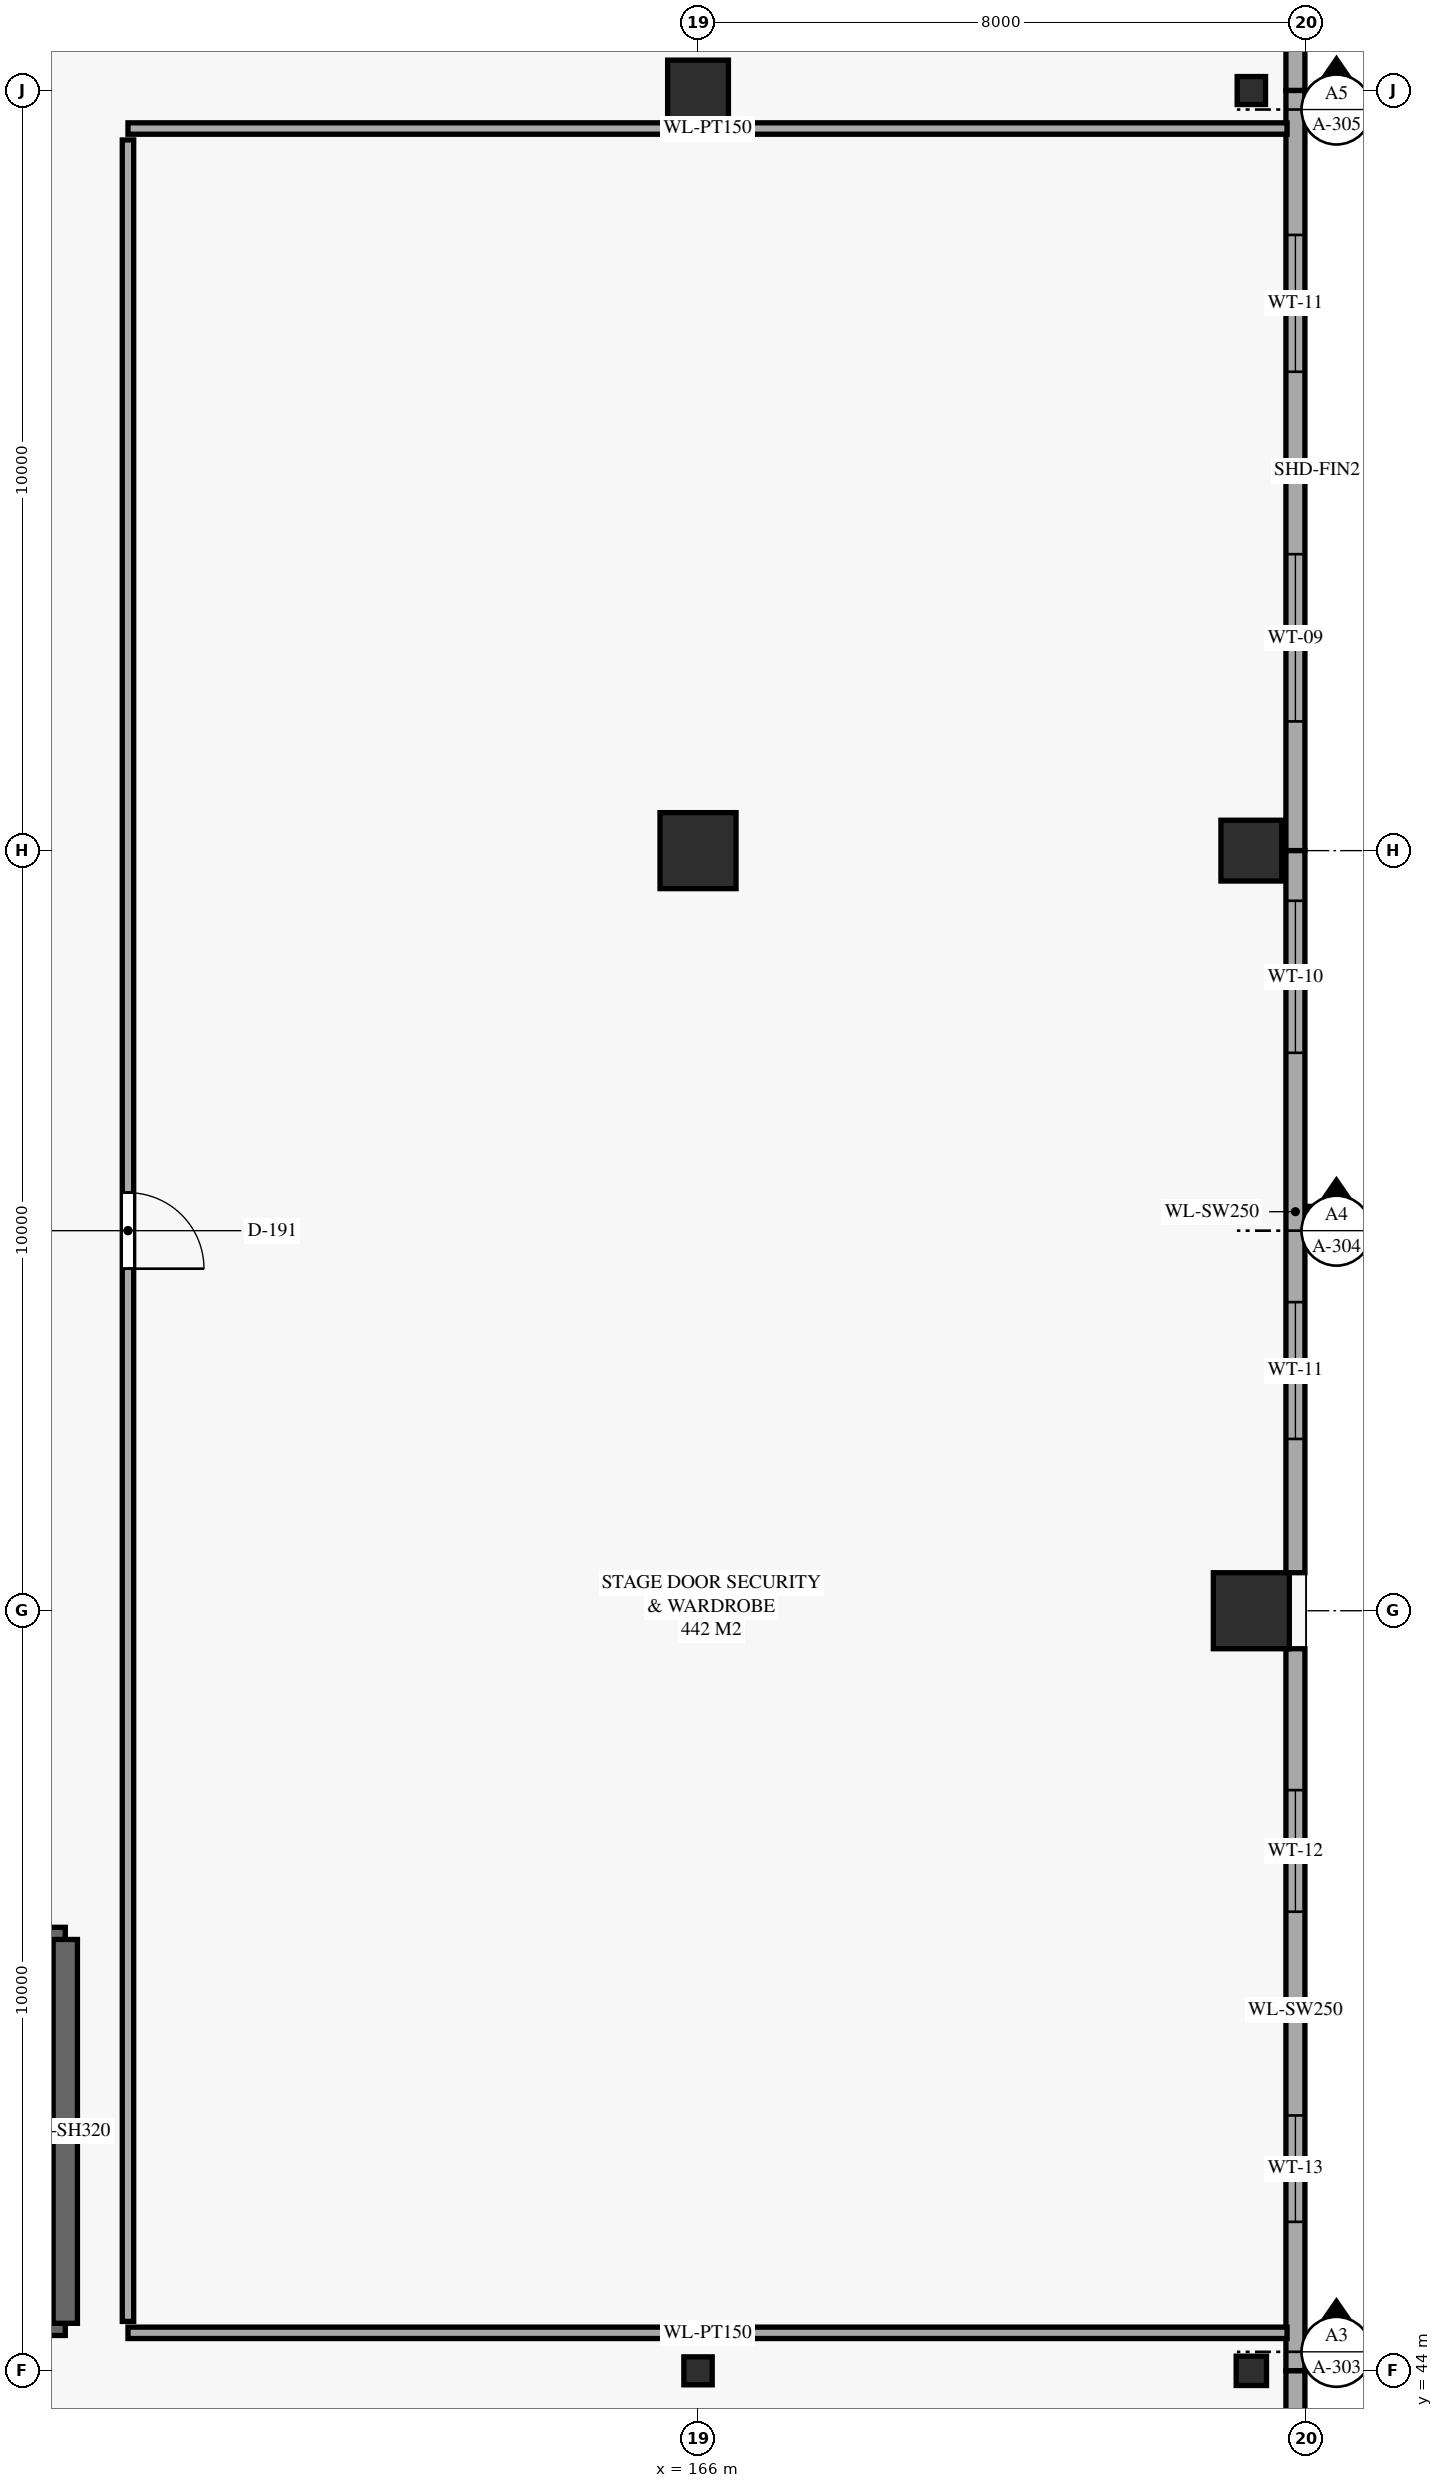
"""IFC4 building model, lengths in metres.
Left out: names, types, materials, properties, quantities, classifications, styles, units other than length and angle.
Written with IfcOpenShell. Run it as: python <this file> out.ifc"""

import sys

from ifc_helpers import new_model, si_unit, direction, frame, frame_2d, origin, origin_2d, place, context, subcontext, project, spatial, rectangle, i_section, extrude, element, fill, save


model = new_model("IFC4")
c1 = context("Model", 3, precision=1e-05, world=origin(), true_north=direction((0.0, 1.0)))
c2 = subcontext(c1, "Body", "Model", "MODEL_VIEW")
j1 = project(units=[si_unit("LENGTHUNIT", "METRE"), si_unit("PLANEANGLEUNIT", "RADIAN")], contexts=[c1])
p1 = place(None, origin())
s1 = spatial("IfcSite", under=j1, at=p1, CompositionType="ELEMENT")
p2 = place(p1, origin())
s2 = spatial("IfcBuilding", under=s1, at=p2, CompositionType="ELEMENT")
p3 = place(p2, origin())
s3 = spatial("IfcBuildingStorey", under=s2, at=p3, CompositionType="ELEMENT", Elevation=0.0)
p4 = place(p3, frame((166.0, 44.0, 0.0), z_axis=(0.0, 0.0, 1.0), x_axis=(1.0, 0.0, 0.0)))
e1 = element("IfcColumn", 1, at=p4, inside=s3, PredefinedType="COLUMN", context=c2, shape_type="SweptSolid", body=[
    extrude(i_section(OverallWidth=0.373, OverallDepth=0.368, WebThickness=0.015, FlangeThickness=0.024, FilletRadius=0.015, at=origin_2d()), origin(), (0.0, 0.0, 1.0), 5.0),
])
p5 = place(p3, frame((166.0, 54.0, 0.0), z_axis=(0.0, 0.0, 1.0), x_axis=(1.0, 0.0, 0.0)))
e2 = element("IfcColumn", 2, at=p5, inside=s3, PredefinedType="COLUMN", context=c2, shape_type="SweptSolid", body=[
    extrude(i_section(OverallWidth=0.399, OverallDepth=0.386, WebThickness=0.021, FlangeThickness=0.033, FilletRadius=0.016, at=origin_2d()), origin(), (0.0, 0.0, 1.0), 5.0),
])
p6 = place(p3, frame((166.0, 64.0, 0.0), z_axis=(0.0, 0.0, 1.0), x_axis=(1.0, 0.0, 0.0)))
e3 = element("IfcColumn", 3, at=p6, inside=s3, PredefinedType="COLUMN", context=c2, shape_type="SweptSolid", body=[
    extrude(rectangle(XDim=1.0, YDim=1.0, at=origin_2d()), origin(), (0.0, 0.0, 1.0), 5.0),
])
p7 = place(p3, frame((166.0, 74.0, 0.0), z_axis=(0.0, 0.0, 1.0), x_axis=(1.0, 0.0, 0.0)))
e4 = element("IfcColumn", 4, at=p7, inside=s3, PredefinedType="COLUMN", context=c2, shape_type="SweptSolid", body=[
    extrude(rectangle(XDim=0.8, YDim=0.8, at=origin_2d()), origin(), (0.0, 0.0, 1.0), 5.0),
])
p8 = place(p3, frame((173.28, 44.0, 0.0), z_axis=(0.0, 0.0, 1.0), x_axis=(1.0, 0.0, 0.0)))
e5 = element("IfcColumn", 5, at=p8, inside=s3, PredefinedType="COLUMN", context=c2, shape_type="SweptSolid", body=[
    extrude(i_section(OverallWidth=0.399, OverallDepth=0.386, WebThickness=0.021, FlangeThickness=0.033, FilletRadius=0.016, at=origin_2d()), origin(), (0.0, 0.0, 1.0), 5.0),
])
p9 = place(p3, frame((173.28, 54.0, 0.0), z_axis=(0.0, 0.0, 1.0), x_axis=(1.0, 0.0, 0.0)))
e6 = element("IfcColumn", 6, at=p9, inside=s3, PredefinedType="COLUMN", context=c2, shape_type="SweptSolid", body=[
    extrude(rectangle(XDim=1.0, YDim=1.0, at=origin_2d()), origin(), (0.0, 0.0, 1.0), 5.0),
])
p10 = place(p3, frame((173.28, 64.0, 0.0), z_axis=(0.0, 0.0, 1.0), x_axis=(1.0, 0.0, 0.0)))
e7 = element("IfcColumn", 7, at=p10, inside=s3, PredefinedType="COLUMN", context=c2, shape_type="SweptSolid", body=[
    extrude(rectangle(XDim=0.8, YDim=0.8, at=origin_2d()), origin(), (0.0, 0.0, 1.0), 5.0),
])
p11 = place(p3, frame((173.28, 74.0, 0.0), z_axis=(0.0, 0.0, 1.0), x_axis=(1.0, 0.0, 0.0)))
e8 = element("IfcColumn", 8, at=p11, inside=s3, PredefinedType="COLUMN", context=c2, shape_type="SweptSolid", body=[
    extrude(i_section(OverallWidth=0.373, OverallDepth=0.368, WebThickness=0.015, FlangeThickness=0.024, FilletRadius=0.015, at=origin_2d()), origin(), (0.0, 0.0, 1.0), 5.0),
])
p12 = place(p3, frame((148.425, 44.625, 0.0), z_axis=(0.0, 0.0, 1.0), x_axis=(1.0, 0.0, 0.0)))
e9 = element("IfcWall", 9, at=p12, inside=s3, PredefinedType="SHEAR", context=c2, shape_type="SweptSolid", body=[
    extrude(rectangle(XDim=9.25, YDim=0.32, at=frame_2d((4.625, 0.0))), origin(), (0.0, 0.0, 1.0), 4.72),
])
p13 = place(p3, frame((157.675, 49.675, 0.0), z_axis=(0.0, 0.0, 1.0), x_axis=(-1.0, 0.0, 0.0)))
e10 = element("IfcWall", 10, at=p13, inside=s3, PredefinedType="SHEAR", context=c2, shape_type="SweptSolid", body=[
    extrude(rectangle(XDim=9.25, YDim=0.32, at=frame_2d((4.625, 0.0))), origin(), (0.0, 0.0, 1.0), 4.72),
])
p14 = place(p13, frame((7.2, 0.0, 0.0)))
e11 = element("IfcOpeningElement", 11, at=p14, cuts=e10, PredefinedType="OPENING", context=c2, shape_type="SweptSolid", body=[
    extrude(rectangle(XDim=1.15, YDim=2.2, at=frame_2d((0.575, 1.1))), frame((0.0, 0.17, 0.0), z_axis=(0.0, -1.0, 0.0), x_axis=(1.0, 0.0, 0.0)), (0.0, 0.0, 1.0), 0.34),
])
p15 = place(p3, frame((157.675, 44.625, 0.0), z_axis=(0.0, 0.0, 1.0), x_axis=(0.0, 1.0, 0.0)))
e12 = element("IfcWall", 12, at=p15, inside=s3, PredefinedType="SHEAR", context=c2, shape_type="SweptSolid", body=[
    extrude(rectangle(XDim=5.05, YDim=0.32, at=frame_2d((2.525, 0.0))), origin(), (0.0, 0.0, 1.0), 4.72),
])
p16 = place(p3, frame((173.86, 84.0, 0.0), z_axis=(0.0, 0.0, 1.0), x_axis=(0.0, -1.0, 0.0)))
e13 = element("IfcWall", 13, at=p16, inside=s3, PredefinedType="SOLIDWALL", context=c2, shape_type="SweptSolid", body=[
    extrude(rectangle(XDim=10.0, YDim=0.25, at=frame_2d((5.0, 0.0))), origin(), (0.0, 0.0, 1.0), 4.69),
])
p17 = place(p16, frame((2.1, 0.0, 0.65)))
e14 = element("IfcOpeningElement", 14, at=p17, cuts=e13, PredefinedType="OPENING", context=c2, shape_type="SweptSolid", body=[
    extrude(rectangle(XDim=1.4, YDim=2.3, at=frame_2d((0.7, 1.15))), frame((0.0, 0.135, 0.0), z_axis=(0.0, -1.0, 0.0), x_axis=(1.0, 0.0, 0.0)), (0.0, 0.0, 1.0), 0.27),
])
p18 = place(p16, frame((6.6, 0.0, 0.65)))
e15 = element("IfcOpeningElement", 15, at=p18, cuts=e13, PredefinedType="OPENING", context=c2, shape_type="SweptSolid", body=[
    extrude(rectangle(XDim=1.2, YDim=2.3, at=frame_2d((0.6, 1.15))), frame((0.0, 0.135, 0.0), z_axis=(0.0, -1.0, 0.0), x_axis=(1.0, 0.0, 0.0)), (0.0, 0.0, 1.0), 0.27),
])
p19 = place(p3, frame((173.86, 74.0, 0.0), z_axis=(0.0, 0.0, 1.0), x_axis=(0.0, -1.0, 0.0)))
e16 = element("IfcWall", 16, at=p19, inside=s3, PredefinedType="SOLIDWALL", context=c2, shape_type="SweptSolid", body=[
    extrude(rectangle(XDim=10.0, YDim=0.25, at=frame_2d((5.0, 0.0))), origin(), (0.0, 0.0, 1.0), 4.72),
])
p20 = place(p19, frame((1.9, 0.0, 0.65)))
e17 = element("IfcOpeningElement", 17, at=p20, cuts=e16, PredefinedType="OPENING", context=c2, shape_type="SweptSolid", body=[
    extrude(rectangle(XDim=1.8, YDim=2.05, at=frame_2d((0.9, 1.025))), frame((0.0, 0.135, 0.0), z_axis=(0.0, -1.0, 0.0), x_axis=(1.0, 0.0, 0.0)), (0.0, 0.0, 1.0), 0.27),
])
p21 = place(p19, frame((6.1, 0.0, 0.65)))
e18 = element("IfcOpeningElement", 18, at=p21, cuts=e16, PredefinedType="OPENING", context=c2, shape_type="SweptSolid", body=[
    extrude(rectangle(XDim=2.2, YDim=2.05, at=frame_2d((1.1, 1.025))), frame((0.0, 0.135, 0.0), z_axis=(0.0, -1.0, 0.0), x_axis=(1.0, 0.0, 0.0)), (0.0, 0.0, 1.0), 0.27),
])
p22 = place(p3, frame((173.86, 64.0, 0.0), z_axis=(0.0, 0.0, 1.0), x_axis=(0.0, -1.0, 0.0)))
e19 = element("IfcWall", 19, at=p22, inside=s3, PredefinedType="SOLIDWALL", context=c2, shape_type="SweptSolid", body=[
    extrude(rectangle(XDim=9.5, YDim=0.25, at=frame_2d((4.75, 0.0))), origin(), (0.0, 0.0, 1.0), 4.72),
])
p23 = place(p22, frame((0.66, 0.0, 0.65)))
e20 = element("IfcOpeningElement", 20, at=p23, cuts=e19, PredefinedType="OPENING", context=c2, shape_type="SweptSolid", body=[
    extrude(rectangle(XDim=2.0, YDim=2.05, at=frame_2d((1.0, 1.025))), frame((0.0, 0.135, 0.0), z_axis=(0.0, -1.0, 0.0), x_axis=(1.0, 0.0, 0.0)), (0.0, 0.0, 1.0), 0.27),
])
p24 = place(p22, frame((5.94, 0.0, 0.65)))
e21 = element("IfcOpeningElement", 21, at=p24, cuts=e19, PredefinedType="OPENING", context=c2, shape_type="SweptSolid", body=[
    extrude(rectangle(XDim=1.8, YDim=2.05, at=frame_2d((0.9, 1.025))), frame((0.0, 0.135, 0.0), z_axis=(0.0, -1.0, 0.0), x_axis=(1.0, 0.0, 0.0)), (0.0, 0.0, 1.0), 0.27),
])
p25 = place(p3, frame((173.86, 53.5, 0.0), z_axis=(0.0, 0.0, 1.0), x_axis=(0.0, -1.0, 0.0)))
e22 = element("IfcWall", 22, at=p25, inside=s3, PredefinedType="SOLIDWALL", context=c2, shape_type="SweptSolid", body=[
    extrude(rectangle(XDim=9.5, YDim=0.25, at=frame_2d((4.75, 0.0))), origin(), (0.0, 0.0, 1.0), 4.72),
])
p26 = place(p25, frame((1.86, 0.0, 0.65)))
e23 = element("IfcOpeningElement", 23, at=p26, cuts=e22, PredefinedType="OPENING", context=c2, shape_type="SweptSolid", body=[
    extrude(rectangle(XDim=1.6, YDim=2.05, at=frame_2d((0.8, 1.025))), frame((0.0, 0.135, 0.0), z_axis=(0.0, -1.0, 0.0), x_axis=(1.0, 0.0, 0.0)), (0.0, 0.0, 1.0), 0.27),
])
p27 = place(p25, frame((6.14, 0.0, 0.65)))
e24 = element("IfcOpeningElement", 24, at=p27, cuts=e22, PredefinedType="OPENING", context=c2, shape_type="SweptSolid", body=[
    extrude(rectangle(XDim=1.4, YDim=2.05, at=frame_2d((0.7, 1.025))), frame((0.0, 0.135, 0.0), z_axis=(0.0, -1.0, 0.0), x_axis=(1.0, 0.0, 0.0)), (0.0, 0.0, 1.0), 0.27),
])
p28 = place(p3, frame((173.86, 44.0, 0.0), z_axis=(0.0, 0.0, 1.0), x_axis=(0.0, -1.0, 0.0)))
e25 = element("IfcWall", 25, at=p28, inside=s3, PredefinedType="SOLIDWALL", context=c2, shape_type="SweptSolid", body=[
    extrude(rectangle(XDim=5.28, YDim=0.25, at=frame_2d((2.64, 0.0))), origin(), (0.0, 0.0, 1.0), 4.72),
])
p29 = place(p28, frame((2.04, 0.0, 0.65)))
e26 = element("IfcOpeningElement", 26, at=p29, cuts=e25, PredefinedType="OPENING", context=c2, shape_type="SweptSolid", body=[
    extrude(rectangle(XDim=1.2, YDim=2.05, at=frame_2d((0.6, 1.025))), frame((0.0, 0.135, 0.0), z_axis=(0.0, -1.0, 0.0), x_axis=(1.0, 0.0, 0.0)), (0.0, 0.0, 1.0), 0.27),
])
for number, where, z_axis, x_axis in (
    (27, (158.5, 44.5, 0.0), (0.0, 0.0, 1.0), (1.0, 0.0, 0.0)),
    (28, (173.75, 73.5, 0.0), (0.0, 0.0, 1.0), (-1.0, 0.0, 0.0)),
):
    element("IfcWall", number, at=place(p3, frame(where, z_axis=z_axis, x_axis=x_axis)), inside=s3, PredefinedType="PARTITIONING", context=c2, shape_type="SweptSolid", body=[
        extrude(rectangle(XDim=15.25, YDim=0.15, at=frame_2d((7.625, 0.0))), origin(), (0.0, 0.0, 1.0), 4.72),
    ])
p30 = place(p3, frame((158.5, 73.35, 0.0), z_axis=(0.0, 0.0, 1.0), x_axis=(0.0, -1.0, 0.0)))
e29 = element("IfcWall", 29, at=p30, inside=s3, PredefinedType="PARTITIONING", context=c2, shape_type="SweptSolid", body=[
    extrude(rectangle(XDim=28.7, YDim=0.15, at=frame_2d((14.35, 0.0))), origin(), (0.0, 0.0, 1.0), 4.72),
])
p31 = place(p30, frame((13.85, 0.0, 0.0)))
e30 = element("IfcOpeningElement", 30, at=p31, cuts=e29, PredefinedType="OPENING", context=c2, shape_type="SweptSolid", body=[
    extrude(rectangle(XDim=1.0, YDim=2.15, at=frame_2d((0.5, 1.075))), frame((0.0, 0.085, 0.0), z_axis=(0.0, -1.0, 0.0), x_axis=(1.0, 0.0, 0.0)), (0.0, 0.0, 1.0), 0.17),
])
p32 = place(p20, origin())
e31 = element("IfcWindow", 31, at=p32, inside=s3, PartitioningType="SINGLE_PANEL", PredefinedType="WINDOW", context=c2, shape_type="SweptSolid", body=[
    extrude(rectangle(XDim=1.8, YDim=2.05, at=frame_2d((0.9, 1.025))), frame((0.0, 0.03, 0.0), z_axis=(0.0, -1.0, 0.0), x_axis=(1.0, 0.0, 0.0)), (0.0, 0.0, 1.0), 0.06),
])
fill(e17, e31)
p33 = place(p21, origin())
e32 = element("IfcWindow", 32, at=p33, inside=s3, PartitioningType="SINGLE_PANEL", PredefinedType="WINDOW", context=c2, shape_type="SweptSolid", body=[
    extrude(rectangle(XDim=2.2, YDim=2.05, at=frame_2d((1.1, 1.025))), frame((0.0, 0.03, 0.0), z_axis=(0.0, -1.0, 0.0), x_axis=(1.0, 0.0, 0.0)), (0.0, 0.0, 1.0), 0.06),
])
fill(e18, e32)
p34 = place(p23, origin())
e33 = element("IfcWindow", 33, at=p34, inside=s3, PartitioningType="SINGLE_PANEL", PredefinedType="WINDOW", context=c2, shape_type="SweptSolid", body=[
    extrude(rectangle(XDim=2.0, YDim=2.05, at=frame_2d((1.0, 1.025))), frame((0.0, 0.03, 0.0), z_axis=(0.0, -1.0, 0.0), x_axis=(1.0, 0.0, 0.0)), (0.0, 0.0, 1.0), 0.06),
])
fill(e20, e33)
p35 = place(p24, origin())
e34 = element("IfcWindow", 34, at=p35, inside=s3, PartitioningType="SINGLE_PANEL", PredefinedType="WINDOW", context=c2, shape_type="SweptSolid", body=[
    extrude(rectangle(XDim=1.8, YDim=2.05, at=frame_2d((0.9, 1.025))), frame((0.0, 0.03, 0.0), z_axis=(0.0, -1.0, 0.0), x_axis=(1.0, 0.0, 0.0)), (0.0, 0.0, 1.0), 0.06),
])
fill(e21, e34)
p36 = place(p26, origin())
e35 = element("IfcWindow", 35, at=p36, inside=s3, PartitioningType="SINGLE_PANEL", PredefinedType="WINDOW", context=c2, shape_type="SweptSolid", body=[
    extrude(rectangle(XDim=1.6, YDim=2.05, at=frame_2d((0.8, 1.025))), frame((0.0, 0.03, 0.0), z_axis=(0.0, -1.0, 0.0), x_axis=(1.0, 0.0, 0.0)), (0.0, 0.0, 1.0), 0.06),
])
fill(e23, e35)
p37 = place(p27, origin())
e36 = element("IfcWindow", 36, at=p37, inside=s3, PartitioningType="SINGLE_PANEL", PredefinedType="WINDOW", context=c2, shape_type="SweptSolid", body=[
    extrude(rectangle(XDim=1.4, YDim=2.05, at=frame_2d((0.7, 1.025))), frame((0.0, 0.03, 0.0), z_axis=(0.0, -1.0, 0.0), x_axis=(1.0, 0.0, 0.0)), (0.0, 0.0, 1.0), 0.06),
])
fill(e24, e36)
p38 = place(p31, origin())
e37 = element("IfcDoor", 37, at=p38, inside=s3, OperationType="SINGLE_SWING_RIGHT", PredefinedType="DOOR", context=c2, shape_type="SweptSolid", body=[
    extrude(rectangle(XDim=1.0, YDim=2.15, at=frame_2d((0.5, 1.075))), frame((0.0, 0.025, 0.0), z_axis=(0.0, -1.0, 0.0), x_axis=(1.0, 0.0, 0.0)), (0.0, 0.0, 1.0), 0.05),
])
fill(e30, e37)
save(model, sys.argv[1])
